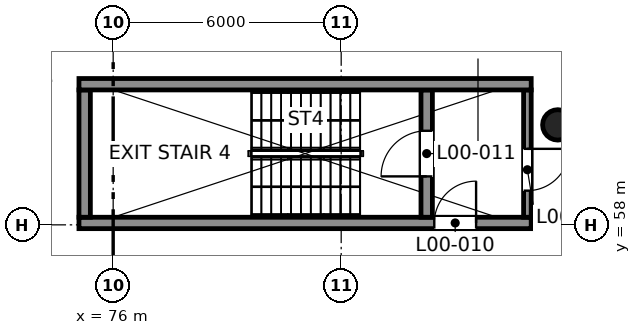
"""IFC4 building model, lengths in metres.
Left out: names, types, materials, properties, quantities, classifications, styles, units other than length and angle.
Written with IfcOpenShell. Run it as: python <this file> out.ifc"""

import sys

from ifc_helpers import new_model, si_unit, direction, frame, frame_2d, origin, origin_2d, place, context, subcontext, project, spatial, rectangle, circle, extrude, element, fill, save


model = new_model("IFC4")
c1 = context("Model", 3, precision=1e-05, world=origin(), true_north=direction((0.0, 1.0)))
c2 = subcontext(c1, "Body", "Model", "MODEL_VIEW")
j1 = project(units=[si_unit("LENGTHUNIT", "METRE"), si_unit("PLANEANGLEUNIT", "RADIAN")], contexts=[c1])
p1 = place(None, origin())
s1 = spatial("IfcSite", under=j1, at=p1, CompositionType="ELEMENT")
p2 = place(p1, origin())
s2 = spatial("IfcBuilding", under=s1, at=p2, CompositionType="ELEMENT")
p3 = place(p2, origin())
s3 = spatial("IfcBuildingStorey", under=s2, at=p3, CompositionType="ELEMENT", Elevation=0.0)
p4 = place(p3, frame((87.7, 60.63, 0.0), z_axis=(0.0, 0.0, 1.0), x_axis=(1.0, 0.0, 0.0)))
e1 = element("IfcColumn", 1, at=p4, inside=s3, PredefinedType="COLUMN", context=c2, shape_type="SweptSolid", body=[
    extrude(circle(Radius=0.4, at=origin_2d()), origin(), (0.0, 0.0, 1.0), 9.0),
])
p5 = place(p3, frame((75.1, 58.05, 0.0), z_axis=(0.0, 0.0, 1.0), x_axis=(1.0, 0.0, 0.0)))
e2 = element("IfcWall", 2, at=p5, inside=s3, PredefinedType="SHEAR", context=c2, shape_type="SweptSolid", body=[
    extrude(rectangle(XDim=11.9, YDim=0.3, at=frame_2d((5.95, 0.0))), origin(), (0.0, 0.0, 1.0), 9.0),
])
p6 = place(p5, frame((9.35, 0.0, 0.0)))
e3 = element("IfcOpeningElement", 3, at=p6, cuts=e2, PredefinedType="OPENING", context=c2, shape_type="SweptSolid", body=[
    extrude(rectangle(XDim=1.1, YDim=2.1, at=frame_2d((0.55, 1.05))), frame((0.0, 0.16, 0.0), z_axis=(0.0, -1.0, 0.0), x_axis=(1.0, 0.0, 0.0)), (0.0, 0.0, 1.0), 0.32),
])
p7 = place(p3, frame((75.25, 58.2, 0.0), z_axis=(0.0, 0.0, 1.0), x_axis=(0.0, 1.0, 0.0)))
e4 = element("IfcWall", 4, at=p7, inside=s3, PredefinedType="SHEAR", context=c2, shape_type="SweptSolid", body=[
    extrude(rectangle(XDim=3.35, YDim=0.3, at=frame_2d((1.675, 0.0))), origin(), (0.0, 0.0, 1.0), 9.0),
])
p8 = place(p3, frame((84.25, 58.2, 0.0), z_axis=(0.0, 0.0, 1.0), x_axis=(0.0, 1.0, 0.0)))
e5 = element("IfcWall", 5, at=p8, inside=s3, PredefinedType="SHEAR", context=c2, shape_type="SweptSolid", body=[
    extrude(rectangle(XDim=3.35, YDim=0.3, at=frame_2d((1.675, 0.0))), origin(), (0.0, 0.0, 1.0), 9.0),
])
p9 = place(p8, frame((1.075, 0.0, 0.0)))
e6 = element("IfcOpeningElement", 6, at=p9, cuts=e5, PredefinedType="OPENING", context=c2, shape_type="SweptSolid", body=[
    extrude(rectangle(XDim=1.2, YDim=2.1, at=frame_2d((0.6, 1.05))), frame((0.0, 0.16, 0.0), z_axis=(0.0, -1.0, 0.0), x_axis=(1.0, 0.0, 0.0)), (0.0, 0.0, 1.0), 0.32),
])
p10 = place(p3, frame((86.9, 58.2, 0.0), z_axis=(0.0, 0.0, 1.0), x_axis=(0.0, 1.0, 0.0)))
e7 = element("IfcWall", 7, at=p10, inside=s3, PredefinedType="SHEAR", context=c2, shape_type="SweptSolid", body=[
    extrude(rectangle(XDim=3.35, YDim=0.2, at=frame_2d((1.675, 0.0))), origin(), (0.0, 0.0, 1.0), 9.0),
])
p11 = place(p10, frame((0.7, 0.0, 0.0)))
e8 = element("IfcOpeningElement", 8, at=p11, cuts=e7, PredefinedType="OPENING", context=c2, shape_type="SweptSolid", body=[
    extrude(rectangle(XDim=1.1, YDim=2.1, at=frame_2d((0.55, 1.05))), frame((0.0, 0.11, 0.0), z_axis=(0.0, -1.0, 0.0), x_axis=(1.0, 0.0, 0.0)), (0.0, 0.0, 1.0), 0.22),
])
p12 = place(p3, frame((75.1, 61.7, 0.0), z_axis=(0.0, 0.0, 1.0), x_axis=(1.0, 0.0, 0.0)))
e9 = element("IfcWall", 9, at=p12, inside=s3, PredefinedType="SHEAR", context=c2, shape_type="SweptSolid", body=[
    extrude(rectangle(XDim=11.9, YDim=0.3, at=frame_2d((5.95, 0.0))), origin(), (0.0, 0.0, 1.0), 9.0),
])
p13 = place(p6, origin())
e10 = element("IfcDoor", 10, at=p13, inside=s3, OperationType="SINGLE_SWING_RIGHT", PredefinedType="DOOR", context=c2, shape_type="SweptSolid", body=[
    extrude(rectangle(XDim=1.1, YDim=2.1, at=frame_2d((0.55, 1.05))), frame((0.0, 0.025, 0.0), z_axis=(0.0, -1.0, 0.0), x_axis=(1.0, 0.0, 0.0)), (0.0, 0.0, 1.0), 0.05),
])
fill(e3, e10)
p14 = place(p9, origin())
e11 = element("IfcDoor", 11, at=p14, inside=s3, OperationType="SINGLE_SWING_LEFT", PredefinedType="DOOR", context=c2, shape_type="SweptSolid", body=[
    extrude(rectangle(XDim=1.2, YDim=2.1, at=frame_2d((0.6, 1.05))), frame((0.0, 0.025, 0.0), z_axis=(0.0, -1.0, 0.0), x_axis=(1.0, 0.0, 0.0)), (0.0, 0.0, 1.0), 0.05),
])
fill(e6, e11)
p15 = place(p11, frame((1.1, 0.0, 0.0), z_axis=(0.0, 0.0, 1.0), x_axis=(-1.0, 0.0, 0.0)))
e12 = element("IfcDoor", 12, at=p15, inside=s3, OperationType="SINGLE_SWING_LEFT", PredefinedType="DOOR", context=c2, shape_type="SweptSolid", body=[
    extrude(rectangle(XDim=1.1, YDim=2.1, at=frame_2d((0.55, 1.05))), frame((0.0, 0.025, 0.0), z_axis=(0.0, -1.0, 0.0), x_axis=(1.0, 0.0, 0.0)), (0.0, 0.0, 1.0), 0.05),
])
fill(e8, e12)
save(model, sys.argv[1])
